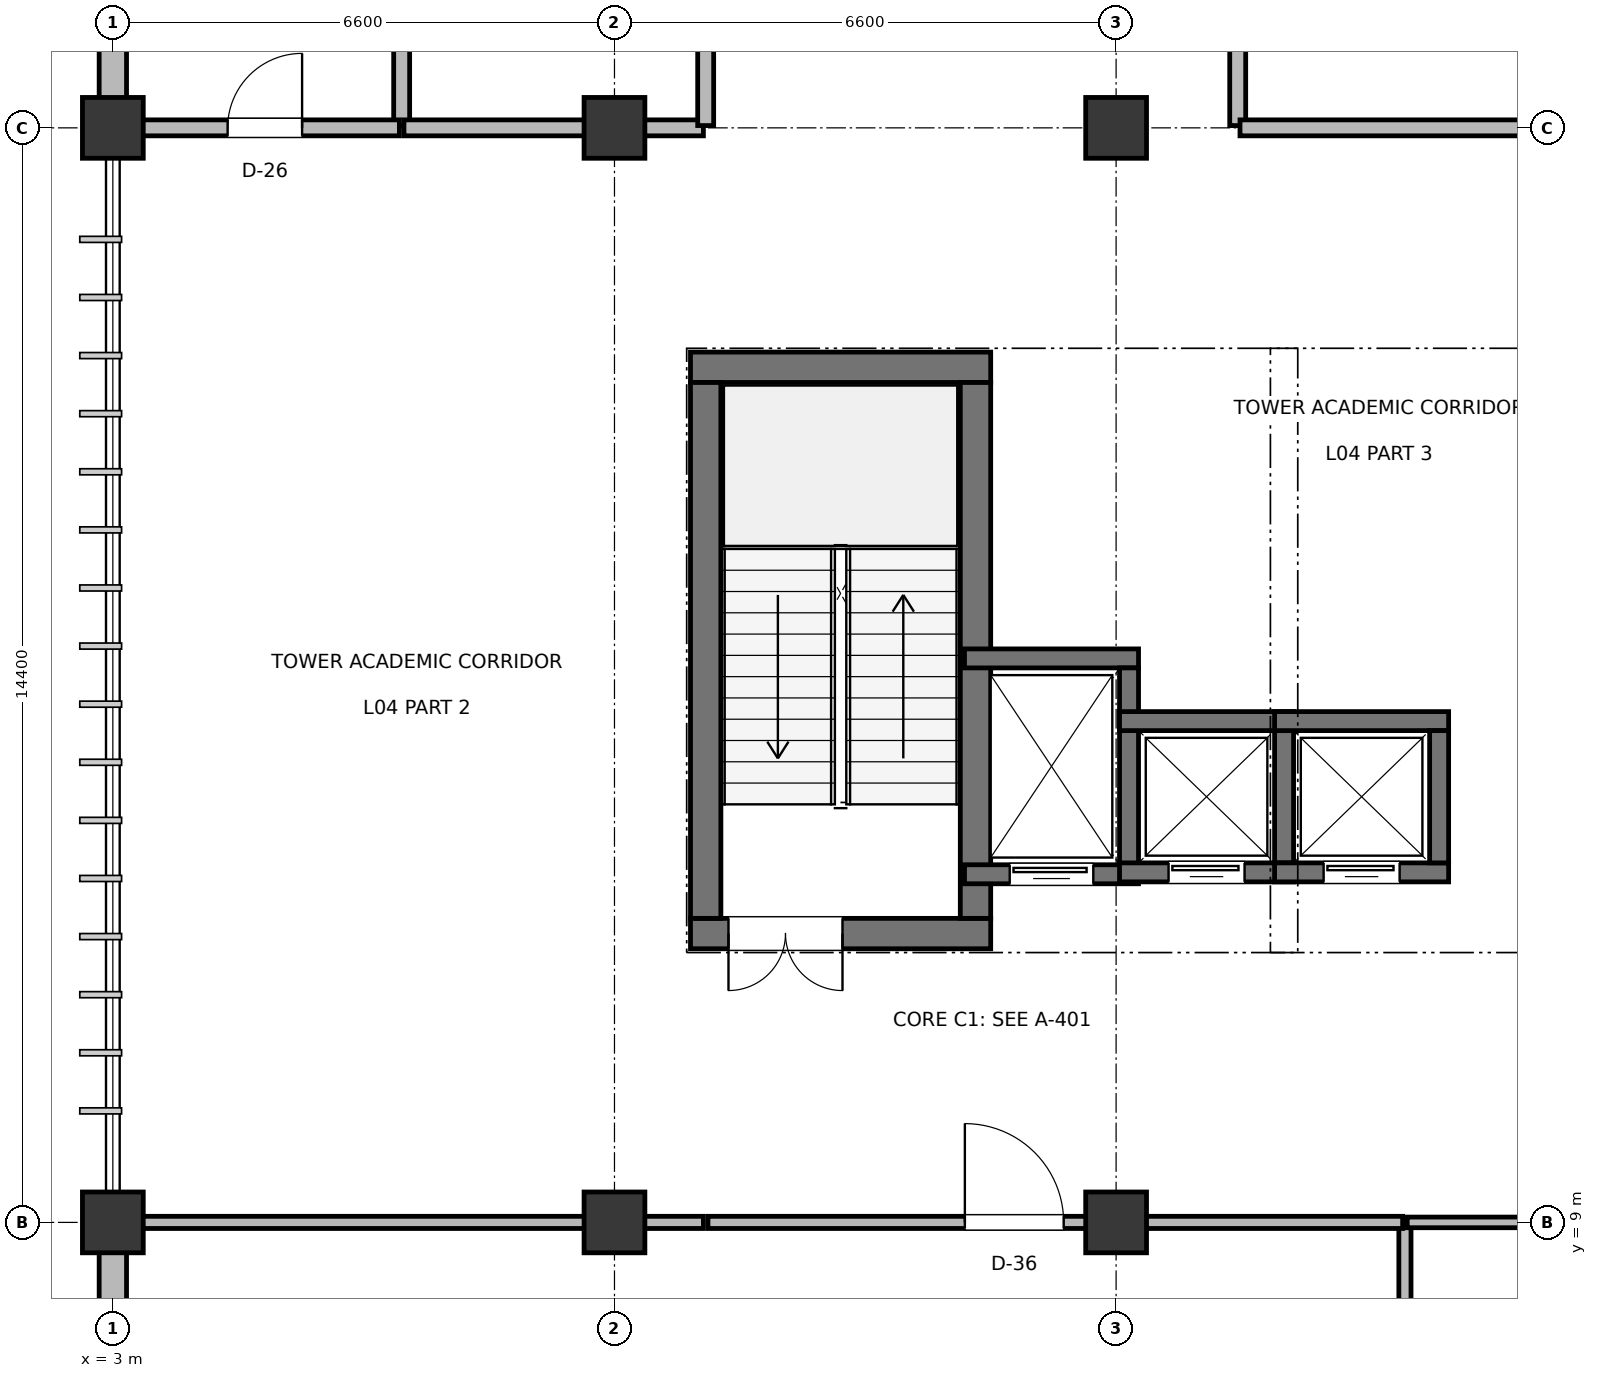
"""IFC4 building model, lengths in metres.
Left out: names, types, materials, properties, quantities, classifications, styles, units other than length and angle.
Written with IfcOpenShell. Run it as: python <this file> out.ifc"""

import sys

from ifc_helpers import new_model, si_unit, direction, frame, frame_2d, origin, origin_2d, place, context, subcontext, project, spatial, rectangle, extrude, element, fill, save


model = new_model("IFC4")
c1 = context("Model", 3, precision=1e-05, world=origin(), true_north=direction((0.0, 1.0)))
c2 = subcontext(c1, "Body", "Model", "MODEL_VIEW")
j1 = project(units=[si_unit("LENGTHUNIT", "METRE"), si_unit("PLANEANGLEUNIT", "RADIAN")], contexts=[c1])
p1 = place(None, origin())
s1 = spatial("IfcSite", under=j1, at=p1, CompositionType="ELEMENT")
p2 = place(p1, origin())
s2 = spatial("IfcBuilding", under=s1, at=p2, CompositionType="ELEMENT")
p3 = place(p2, frame((0.0, 0.0, 19.5)))
s3 = spatial("IfcBuildingStorey", under=s2, at=p3, CompositionType="ELEMENT", Elevation=19.5)
for number, where, z_axis, x_axis in (
    (1, (3.0, 9.0, 0.0), (0.0, 0.0, 1.0), (1.0, 0.0, 0.0)),
    (2, (3.0, 23.4, 0.0), (0.0, 0.0, 1.0), (1.0, 0.0, 0.0)),
    (3, (9.6, 9.0, 0.0), (0.0, 0.0, 1.0), (1.0, 0.0, 0.0)),
    (4, (9.6, 23.4, 0.0), (0.0, 0.0, 1.0), (1.0, 0.0, 0.0)),
    (5, (16.2, 9.0, 0.0), (0.0, 0.0, 1.0), (1.0, 0.0, 0.0)),
    (6, (16.2, 23.4, 0.0), (0.0, 0.0, 1.0), (1.0, 0.0, 0.0)),
):
    element("IfcColumn", number, at=place(p3, frame(where, z_axis=z_axis, x_axis=x_axis)), inside=s3, PredefinedType="COLUMN", context=c2, shape_type="SweptSolid", body=[
        extrude(rectangle(XDim=0.8, YDim=0.8, at=origin_2d()), origin(), (0.0, 0.0, 1.0), 4.5),
    ])
p4 = place(p3, frame((3.0, 3.385, 0.0), z_axis=(0.0, 0.0, 1.0), x_axis=(0.0, 1.0, 0.0)))
e7 = element("IfcWall", 7, at=p4, inside=s3, PredefinedType="SOLIDWALL", context=c2, shape_type="SweptSolid", body=[
    extrude(rectangle(XDim=5.23, YDim=0.36, at=frame_2d((2.615, 0.0))), origin(), (0.0, 0.0, 1.0), 3.575),
])
p5 = place(p4, frame((1.74, 0.0, 0.9)))
e8 = element("IfcOpeningElement", 8, at=p5, cuts=e7, PredefinedType="OPENING", context=c2, shape_type="SweptSolid", body=[
    extrude(rectangle(XDim=1.75, YDim=1.55, at=frame_2d((0.875, 0.775))), frame((0.0, 0.19, 0.0), z_axis=(0.0, -1.0, 0.0), x_axis=(1.0, 0.0, 0.0)), (0.0, 0.0, 1.0), 0.38),
])
p6 = place(p3, frame((3.0, 23.785, 0.0), z_axis=(0.0, 0.0, 1.0), x_axis=(0.0, 1.0, 0.0)))
e9 = element("IfcWall", 9, at=p6, inside=s3, PredefinedType="SOLIDWALL", context=c2, shape_type="SweptSolid", body=[
    extrude(rectangle(XDim=5.83, YDim=0.36, at=frame_2d((2.915, 0.0))), origin(), (0.0, 0.0, 1.0), 3.575),
])
p7 = place(p6, frame((2.04, 0.0, 0.9)))
e10 = element("IfcOpeningElement", 10, at=p7, cuts=e9, PredefinedType="OPENING", context=c2, shape_type="SweptSolid", body=[
    extrude(rectangle(XDim=1.75, YDim=1.75, at=frame_2d((0.875, 0.875))), frame((0.0, 0.19, 0.0), z_axis=(0.0, -1.0, 0.0), x_axis=(1.0, 0.0, 0.0)), (0.0, 0.0, 1.0), 0.38),
])
p8 = place(p3, frame((10.6, 12.8, 0.0), z_axis=(0.0, 0.0, 1.0), x_axis=(1.0, 0.0, 0.0)))
e11 = element("IfcWall", 11, at=p8, inside=s3, PredefinedType="SHEAR", context=c2, shape_type="SweptSolid", body=[
    extrude(rectangle(XDim=3.95, YDim=0.4, at=frame_2d((1.975, 0.0))), origin(), (0.0, 0.0, 1.0), 4.28),
])
p9 = place(p8, frame((0.5, 0.0, 0.0)))
e12 = element("IfcOpeningElement", 12, at=p9, cuts=e11, PredefinedType="OPENING", context=c2, shape_type="SweptSolid", body=[
    extrude(rectangle(XDim=1.5, YDim=2.2, at=frame_2d((0.75, 1.1))), frame((0.0, 0.21, 0.0), z_axis=(0.0, -1.0, 0.0), x_axis=(1.0, 0.0, 0.0)), (0.0, 0.0, 1.0), 0.42),
])
p10 = place(p3, frame((10.6, 20.25, 0.0), z_axis=(0.0, 0.0, 1.0), x_axis=(1.0, 0.0, 0.0)))
e13 = element("IfcWall", 13, at=p10, inside=s3, PredefinedType="SHEAR", context=c2, shape_type="SweptSolid", body=[
    extrude(rectangle(XDim=3.95, YDim=0.4, at=frame_2d((1.975, 0.0))), origin(), (0.0, 0.0, 1.0), 4.28),
])
for number, where, z_axis, x_axis in (
    (14, (10.8, 13.0, 0.0), (0.0, 0.0, 1.0), (0.0, 1.0, 0.0)),
    (15, (14.35, 13.0, 0.0), (0.0, 0.0, 1.0), (0.0, 1.0, 0.0)),
):
    element("IfcWall", number, at=place(p3, frame(where, z_axis=z_axis, x_axis=x_axis)), inside=s3, PredefinedType="SHEAR", context=c2, shape_type="SweptSolid", body=[
        extrude(rectangle(XDim=7.05, YDim=0.4, at=frame_2d((3.525, 0.0))), origin(), (0.0, 0.0, 1.0), 4.28),
    ])
p11 = place(p3, frame((14.205, 13.58, 0.0), z_axis=(0.0, 0.0, 1.0), x_axis=(1.0, 0.0, 0.0)))
e16 = element("IfcWall", 16, at=p11, inside=s3, PredefinedType="SHEAR", context=c2, shape_type="SweptSolid", body=[
    extrude(rectangle(XDim=2.29, YDim=0.25, at=frame_2d((1.145, 0.0))), origin(), (0.0, 0.0, 1.0), 4.26),
])
p12 = place(p11, frame((0.595, 0.0, 0.0)))
e17 = element("IfcOpeningElement", 17, at=p12, cuts=e16, PredefinedType="OPENING", context=c2, shape_type="SweptSolid", body=[
    extrude(rectangle(XDim=1.1, YDim=2.2, at=frame_2d((0.55, 1.1))), frame((0.0, 0.135, 0.0), z_axis=(0.0, -1.0, 0.0), x_axis=(1.0, 0.0, 0.0)), (0.0, 0.0, 1.0), 0.27),
])
p13 = place(p3, frame((14.205, 16.42, 0.0), z_axis=(0.0, 0.0, 1.0), x_axis=(1.0, 0.0, 0.0)))
e18 = element("IfcWall", 18, at=p13, inside=s3, PredefinedType="SHEAR", context=c2, shape_type="SweptSolid", body=[
    extrude(rectangle(XDim=2.29, YDim=0.25, at=frame_2d((1.145, 0.0))), origin(), (0.0, 0.0, 1.0), 4.26),
])
p14 = place(p3, frame((16.37, 13.705, 0.0), z_axis=(0.0, 0.0, 1.0), x_axis=(0.0, 1.0, 0.0)))
e19 = element("IfcWall", 19, at=p14, inside=s3, PredefinedType="SHEAR", context=c2, shape_type="SweptSolid", body=[
    extrude(rectangle(XDim=2.59, YDim=0.25, at=frame_2d((1.295, 0.0))), origin(), (0.0, 0.0, 1.0), 4.26),
])
p15 = place(p3, frame((16.245, 13.605, 0.0), z_axis=(0.0, 0.0, 1.0), x_axis=(1.0, 0.0, 0.0)))
e20 = element("IfcWall", 20, at=p15, inside=s3, PredefinedType="SHEAR", context=c2, shape_type="SweptSolid", body=[
    extrude(rectangle(XDim=2.29, YDim=0.25, at=frame_2d((1.145, 0.0))), origin(), (0.0, 0.0, 1.0), 4.26),
])
p16 = place(p15, frame((0.645, 0.0, 0.0)))
e21 = element("IfcOpeningElement", 21, at=p16, cuts=e20, PredefinedType="OPENING", context=c2, shape_type="SweptSolid", body=[
    extrude(rectangle(XDim=1.0, YDim=2.15, at=frame_2d((0.5, 1.075))), frame((0.0, 0.135, 0.0), z_axis=(0.0, -1.0, 0.0), x_axis=(1.0, 0.0, 0.0)), (0.0, 0.0, 1.0), 0.27),
])
p17 = place(p3, frame((16.245, 15.595, 0.0), z_axis=(0.0, 0.0, 1.0), x_axis=(1.0, 0.0, 0.0)))
e22 = element("IfcWall", 22, at=p17, inside=s3, PredefinedType="SHEAR", context=c2, shape_type="SweptSolid", body=[
    extrude(rectangle(XDim=2.29, YDim=0.25, at=frame_2d((1.145, 0.0))), origin(), (0.0, 0.0, 1.0), 4.26),
])
p18 = place(p3, frame((18.41, 13.73, 0.0), z_axis=(0.0, 0.0, 1.0), x_axis=(0.0, 1.0, 0.0)))
e23 = element("IfcWall", 23, at=p18, inside=s3, PredefinedType="SHEAR", context=c2, shape_type="SweptSolid", body=[
    extrude(rectangle(XDim=1.74, YDim=0.25, at=frame_2d((0.87, 0.0))), origin(), (0.0, 0.0, 1.0), 4.26),
])
p19 = place(p3, frame((18.285, 13.605, 0.0), z_axis=(0.0, 0.0, 1.0), x_axis=(1.0, 0.0, 0.0)))
e24 = element("IfcWall", 24, at=p19, inside=s3, PredefinedType="SHEAR", context=c2, shape_type="SweptSolid", body=[
    extrude(rectangle(XDim=2.29, YDim=0.25, at=frame_2d((1.145, 0.0))), origin(), (0.0, 0.0, 1.0), 4.26),
])
p20 = place(p19, frame((0.645, 0.0, 0.0)))
e25 = element("IfcOpeningElement", 25, at=p20, cuts=e24, PredefinedType="OPENING", context=c2, shape_type="SweptSolid", body=[
    extrude(rectangle(XDim=1.0, YDim=2.15, at=frame_2d((0.5, 1.075))), frame((0.0, 0.135, 0.0), z_axis=(0.0, -1.0, 0.0), x_axis=(1.0, 0.0, 0.0)), (0.0, 0.0, 1.0), 0.27),
])
p21 = place(p3, frame((18.285, 15.595, 0.0), z_axis=(0.0, 0.0, 1.0), x_axis=(1.0, 0.0, 0.0)))
e26 = element("IfcWall", 26, at=p21, inside=s3, PredefinedType="SHEAR", context=c2, shape_type="SweptSolid", body=[
    extrude(rectangle(XDim=2.29, YDim=0.25, at=frame_2d((1.145, 0.0))), origin(), (0.0, 0.0, 1.0), 4.26),
])
p22 = place(p3, frame((20.45, 13.73, 0.0), z_axis=(0.0, 0.0, 1.0), x_axis=(0.0, 1.0, 0.0)))
e27 = element("IfcWall", 27, at=p22, inside=s3, PredefinedType="SHEAR", context=c2, shape_type="SweptSolid", body=[
    extrude(rectangle(XDim=1.74, YDim=0.25, at=frame_2d((0.87, 0.0))), origin(), (0.0, 0.0, 1.0), 4.26),
])
p23 = place(p3, frame((20.0, 3.23, 0.0), z_axis=(0.0, 0.0, 1.0), x_axis=(0.0, 1.0, 0.0)))
e28 = element("IfcWall", 28, at=p23, inside=s3, PredefinedType="PARTITIONING", context=c2, shape_type="SweptSolid", body=[
    extrude(rectangle(XDim=5.74, YDim=0.16, at=frame_2d((2.87, 0.0))), origin(), (0.0, 0.0, 1.0), 3.525),
])
p24 = place(p3, frame((3.23, 9.0, 0.0), z_axis=(0.0, 0.0, 1.0), x_axis=(1.0, 0.0, 0.0)))
e29 = element("IfcWall", 29, at=p24, inside=s3, PredefinedType="PARTITIONING", context=c2, shape_type="SweptSolid", body=[
    extrude(rectangle(XDim=7.54, YDim=0.16, at=frame_2d((3.77, 0.0))), origin(), (0.0, 0.0, 1.0), 3.415),
])
p25 = place(p3, frame((10.83, 9.0, 0.0), z_axis=(0.0, 0.0, 1.0), x_axis=(1.0, 0.0, 0.0)))
e30 = element("IfcWall", 30, at=p25, inside=s3, PredefinedType="PARTITIONING", context=c2, shape_type="SweptSolid", body=[
    extrude(rectangle(XDim=9.14, YDim=0.16, at=frame_2d((4.57, 0.0))), origin(), (0.0, 0.0, 1.0), 3.415),
])
p26 = place(p25, frame((3.38, 0.0, 0.0)))
e31 = element("IfcOpeningElement", 31, at=p26, cuts=e30, PredefinedType="OPENING", context=c2, shape_type="SweptSolid", body=[
    extrude(rectangle(XDim=1.3, YDim=2.2, at=frame_2d((0.65, 1.1))), frame((0.0, 0.09, 0.0), z_axis=(0.0, -1.0, 0.0), x_axis=(1.0, 0.0, 0.0)), (0.0, 0.0, 1.0), 0.18),
])
p27 = place(p3, frame((20.03, 9.0, 0.0), z_axis=(0.0, 0.0, 1.0), x_axis=(1.0, 0.0, 0.0)))
e32 = element("IfcWall", 32, at=p27, inside=s3, PredefinedType="PARTITIONING", context=c2, shape_type="SweptSolid", body=[
    extrude(rectangle(XDim=3.94, YDim=0.14, at=frame_2d((1.97, 0.0))), origin(), (0.0, 0.0, 1.0), 3.355),
])
p28 = place(p3, frame((6.8, 23.43, 0.0), z_axis=(0.0, 0.0, 1.0), x_axis=(0.0, 1.0, 0.0)))
e33 = element("IfcWall", 33, at=p28, inside=s3, PredefinedType="PLUMBINGWALL", context=c2, shape_type="SweptSolid", body=[
    extrude(rectangle(XDim=6.54, YDim=0.21, at=frame_2d((3.27, 0.0))), origin(), (0.0, 0.0, 1.0), 3.155),
])
p29 = place(p3, frame((3.23, 23.4, 0.0), z_axis=(0.0, 0.0, 1.0), x_axis=(1.0, 0.0, 0.0)))
e34 = element("IfcWall", 34, at=p29, inside=s3, PredefinedType="PLUMBINGWALL", context=c2, shape_type="SweptSolid", body=[
    extrude(rectangle(XDim=3.54, YDim=0.21, at=frame_2d((1.77, 0.0))), origin(), (0.0, 0.0, 1.0), 3.315),
])
p30 = place(p29, frame((1.28, 0.0, 0.0)))
e35 = element("IfcOpeningElement", 35, at=p30, cuts=e34, PredefinedType="OPENING", context=c2, shape_type="SweptSolid", body=[
    extrude(rectangle(XDim=0.98, YDim=2.1, at=frame_2d((0.49, 1.05))), frame((0.0, 0.115, 0.0), z_axis=(0.0, -1.0, 0.0), x_axis=(1.0, 0.0, 0.0)), (0.0, 0.0, 1.0), 0.23),
])
p31 = place(p3, frame((6.83, 23.4, 0.0), z_axis=(0.0, 0.0, 1.0), x_axis=(1.0, 0.0, 0.0)))
e36 = element("IfcWall", 36, at=p31, inside=s3, PredefinedType="PLUMBINGWALL", context=c2, shape_type="SweptSolid", body=[
    extrude(rectangle(XDim=3.94, YDim=0.21, at=frame_2d((1.97, 0.0))), origin(), (0.0, 0.0, 1.0), 3.315),
])
p32 = place(p3, frame((10.8, 23.43, 0.0), z_axis=(0.0, 0.0, 1.0), x_axis=(0.0, 1.0, 0.0)))
e37 = element("IfcWall", 37, at=p32, inside=s3, PredefinedType="PLUMBINGWALL", context=c2, shape_type="SweptSolid", body=[
    extrude(rectangle(XDim=6.54, YDim=0.21, at=frame_2d((3.27, 0.0))), origin(), (0.0, 0.0, 1.0), 3.425),
])
p33 = place(p32, frame((2.81, 0.0, 0.0)))
e38 = element("IfcOpeningElement", 38, at=p33, cuts=e37, PredefinedType="OPENING", context=c2, shape_type="SweptSolid", body=[
    extrude(rectangle(XDim=0.92, YDim=2.1, at=frame_2d((0.46, 1.05))), frame((0.0, 0.115, 0.0), z_axis=(0.0, -1.0, 0.0), x_axis=(1.0, 0.0, 0.0)), (0.0, 0.0, 1.0), 0.23),
])
p34 = place(p3, frame((17.8, 23.43, 0.0), z_axis=(0.0, 0.0, 1.0), x_axis=(0.0, 1.0, 0.0)))
e39 = element("IfcWall", 39, at=p34, inside=s3, PredefinedType="PLUMBINGWALL", context=c2, shape_type="SweptSolid", body=[
    extrude(rectangle(XDim=6.54, YDim=0.21, at=frame_2d((3.27, 0.0))), origin(), (0.0, 0.0, 1.0), 3.295),
])
p35 = place(p34, frame((2.81, 0.0, 0.0)))
e40 = element("IfcOpeningElement", 40, at=p35, cuts=e39, PredefinedType="OPENING", context=c2, shape_type="SweptSolid", body=[
    extrude(rectangle(XDim=0.92, YDim=2.1, at=frame_2d((0.46, 1.05))), frame((0.0, 0.115, 0.0), z_axis=(0.0, -1.0, 0.0), x_axis=(1.0, 0.0, 0.0)), (0.0, 0.0, 1.0), 0.23),
])
p36 = place(p3, frame((17.83, 23.4, 0.0), z_axis=(0.0, 0.0, 1.0), x_axis=(1.0, 0.0, 0.0)))
e41 = element("IfcWall", 41, at=p36, inside=s3, PredefinedType="PLUMBINGWALL", context=c2, shape_type="SweptSolid", body=[
    extrude(rectangle(XDim=6.14, YDim=0.21, at=frame_2d((3.07, 0.0))), origin(), (0.0, 0.0, 1.0), 3.295),
])
p37 = place(p9, frame((1.5, 0.0, 0.0), z_axis=(0.0, 0.0, 1.0), x_axis=(-1.0, 0.0, 0.0)))
e42 = element("IfcDoor", 42, at=p37, inside=s3, OperationType="DOUBLE_DOOR_SINGLE_SWING", PredefinedType="DOOR", context=c2, shape_type="SweptSolid", body=[
    extrude(rectangle(XDim=1.5, YDim=2.2, at=frame_2d((0.75, 1.1))), frame((0.0, 0.025, 0.0), z_axis=(0.0, -1.0, 0.0), x_axis=(1.0, 0.0, 0.0)), (0.0, 0.0, 1.0), 0.05),
])
fill(e12, e42)
p38 = place(p12, frame((1.1, 0.0, 0.0), z_axis=(0.0, 0.0, 1.0), x_axis=(-1.0, 0.0, 0.0)))
e43 = element("IfcDoor", 43, at=p38, inside=s3, OperationType="SLIDING_TO_LEFT", PredefinedType="DOOR", context=c2, shape_type="SweptSolid", body=[
    extrude(rectangle(XDim=1.1, YDim=2.2, at=frame_2d((0.55, 1.1))), frame((0.0, 0.025, 0.0), z_axis=(0.0, -1.0, 0.0), x_axis=(1.0, 0.0, 0.0)), (0.0, 0.0, 1.0), 0.05),
])
fill(e17, e43)
p39 = place(p16, frame((1.0, 0.0, 0.0), z_axis=(0.0, 0.0, 1.0), x_axis=(-1.0, 0.0, 0.0)))
e44 = element("IfcDoor", 44, at=p39, inside=s3, OperationType="SLIDING_TO_LEFT", PredefinedType="DOOR", context=c2, shape_type="SweptSolid", body=[
    extrude(rectangle(XDim=1.0, YDim=2.15, at=frame_2d((0.5, 1.075))), frame((0.0, 0.025, 0.0), z_axis=(0.0, -1.0, 0.0), x_axis=(1.0, 0.0, 0.0)), (0.0, 0.0, 1.0), 0.05),
])
fill(e21, e44)
p40 = place(p20, frame((1.0, 0.0, 0.0), z_axis=(0.0, 0.0, 1.0), x_axis=(-1.0, 0.0, 0.0)))
e45 = element("IfcDoor", 45, at=p40, inside=s3, OperationType="SLIDING_TO_LEFT", PredefinedType="DOOR", context=c2, shape_type="SweptSolid", body=[
    extrude(rectangle(XDim=1.0, YDim=2.15, at=frame_2d((0.5, 1.075))), frame((0.0, 0.025, 0.0), z_axis=(0.0, -1.0, 0.0), x_axis=(1.0, 0.0, 0.0)), (0.0, 0.0, 1.0), 0.05),
])
fill(e25, e45)
p41 = place(p26, origin())
e46 = element("IfcDoor", 46, at=p41, inside=s3, OperationType="SINGLE_SWING_LEFT", PredefinedType="DOOR", context=c2, shape_type="SweptSolid", body=[
    extrude(rectangle(XDim=1.3, YDim=2.2, at=frame_2d((0.65, 1.1))), frame((0.0, 0.025, 0.0), z_axis=(0.0, -1.0, 0.0), x_axis=(1.0, 0.0, 0.0)), (0.0, 0.0, 1.0), 0.05),
])
fill(e31, e46)
p42 = place(p30, origin())
e47 = element("IfcDoor", 47, at=p42, inside=s3, OperationType="SINGLE_SWING_RIGHT", PredefinedType="DOOR", context=c2, shape_type="SweptSolid", body=[
    extrude(rectangle(XDim=0.98, YDim=2.1, at=frame_2d((0.49, 1.05))), frame((0.0, 0.025, 0.0), z_axis=(0.0, -1.0, 0.0), x_axis=(1.0, 0.0, 0.0)), (0.0, 0.0, 1.0), 0.05),
])
fill(e35, e47)
save(model, sys.argv[1])
